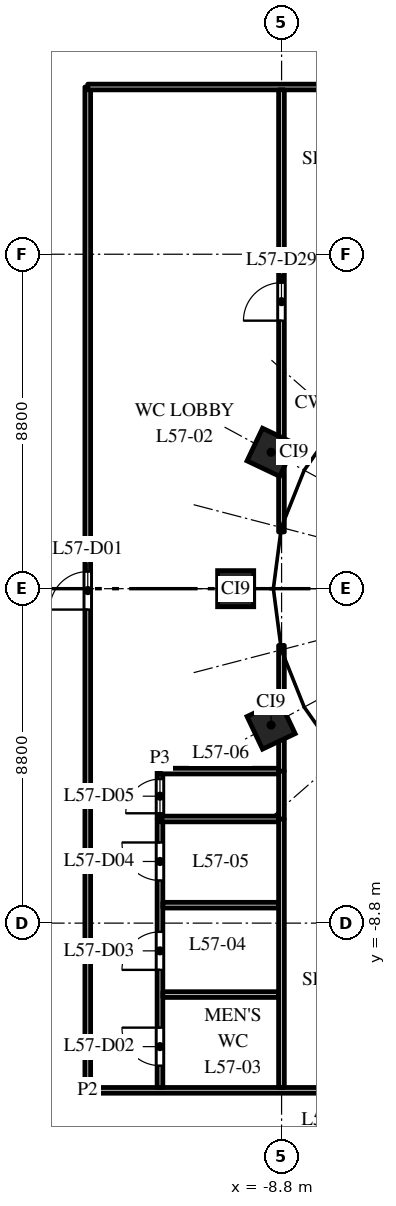
"""IFC4 building model, lengths in metres.
Left out: names, types, materials, properties, quantities, classifications, styles, units other than length and angle.
Written with IfcOpenShell. Run it as: python <this file> out.ifc"""

import sys

from ifc_helpers import new_model, si_unit, direction, frame, frame_2d, origin, origin_2d, place, context, subcontext, project, spatial, rectangle, extrude, element, fill, save


model = new_model("IFC4")
c1 = context("Model", 3, precision=1e-05, world=origin(), true_north=direction((0.0, 1.0)))
c2 = subcontext(c1, "Body", "Model", "MODEL_VIEW")
j1 = project(units=[si_unit("LENGTHUNIT", "METRE"), si_unit("PLANEANGLEUNIT", "RADIAN")], contexts=[c1])
p1 = place(None, origin())
s1 = spatial("IfcSite", under=j1, at=p1, CompositionType="ELEMENT")
p2 = place(p1, origin())
s2 = spatial("IfcBuilding", under=s1, at=p2, CompositionType="ELEMENT")
p3 = place(p2, frame((0.0, 0.0, 269.5)))
s3 = spatial("IfcBuildingStorey", under=s2, at=p3, CompositionType="ELEMENT", Elevation=269.5)
for number, where, z_axis, x_axis in (
    (1, (-9.076, 3.588, 0.0), (0.0, 0.0, 1.0), (-0.429, -0.903, 0.0)),
    (2, (-10.008, 0.0, 0.0), (0.0, 0.0, 1.0), (0.0, -1.0, 0.0)),
    (3, (-9.076, -3.588, 0.0), (0.0, 0.0, 1.0), (0.429, -0.903, 0.0)),
):
    element("IfcColumn", number, at=place(p3, frame(where, z_axis=z_axis, x_axis=x_axis)), inside=s3, PredefinedType="COLUMN", context=c2, shape_type="SweptSolid", body=[
        extrude(rectangle(XDim=0.95, YDim=0.95, at=origin_2d()), origin(), (0.0, 0.0, 1.0), 4.0),
    ])
p4 = place(p3, frame((-13.9, -13.2, 0.0), z_axis=(0.0, 0.0, 1.0), x_axis=(0.0, 1.0, 0.0)))
e4 = element("IfcWall", 4, at=p4, inside=s3, PredefinedType="PARTITIONING", context=c2, shape_type="SweptSolid", body=[
    extrude(rectangle(XDim=26.4, YDim=0.15, at=frame_2d((13.2, 0.0))), origin(), (0.0, 0.0, 1.0), 2.75),
])
p5 = place(p4, frame((12.65, 0.0, 0.0)))
e5 = element("IfcOpeningElement", 5, at=p5, cuts=e4, PredefinedType="OPENING", context=c2, shape_type="SweptSolid", body=[
    extrude(rectangle(XDim=1.0, YDim=2.1, at=frame_2d((0.5, 1.05))), frame((0.0, 0.085, 0.0), z_axis=(0.0, -1.0, 0.0), x_axis=(1.0, 0.0, 0.0)), (0.0, 0.0, 1.0), 0.17),
])
p6 = place(p3, frame((-13.9, -13.2, 0.0), z_axis=(0.0, 0.0, 1.0), x_axis=(1.0, 0.0, 0.0)))
e6 = element("IfcWall", 6, at=p6, inside=s3, PredefinedType="PARTITIONING", context=c2, shape_type="SweptSolid", body=[
    extrude(rectangle(XDim=27.8, YDim=0.15, at=frame_2d((13.9, 0.0))), origin(), (0.0, 0.0, 1.0), 2.85),
])
p7 = place(p6, frame((6.83, 0.0, 0.0)))
e7 = element("IfcOpeningElement", 7, at=p7, cuts=e6, PredefinedType="OPENING", context=c2, shape_type="SweptSolid", body=[
    extrude(rectangle(XDim=1.0, YDim=2.1, at=frame_2d((0.5, 1.05))), frame((0.0, 0.085, 0.0), z_axis=(0.0, -1.0, 0.0), x_axis=(1.0, 0.0, 0.0)), (0.0, 0.0, 1.0), 0.17),
])
p8 = place(p6, frame((11.463, 0.0, 0.0)))
e8 = element("IfcOpeningElement", 8, at=p8, cuts=e6, PredefinedType="OPENING", context=c2, shape_type="SweptSolid", body=[
    extrude(rectangle(XDim=1.0, YDim=2.1, at=frame_2d((0.5, 1.05))), frame((0.0, 0.085, 0.0), z_axis=(0.0, -1.0, 0.0), x_axis=(1.0, 0.0, 0.0)), (0.0, 0.0, 1.0), 0.17),
])
p9 = place(p6, frame((16.097, 0.0, 0.0)))
e9 = element("IfcOpeningElement", 9, at=p9, cuts=e6, PredefinedType="OPENING", context=c2, shape_type="SweptSolid", body=[
    extrude(rectangle(XDim=1.0, YDim=2.1, at=frame_2d((0.5, 1.05))), frame((0.0, 0.085, 0.0), z_axis=(0.0, -1.0, 0.0), x_axis=(1.0, 0.0, 0.0)), (0.0, 0.0, 1.0), 0.17),
])
p10 = place(p3, frame((-13.9, 13.2, 0.0), z_axis=(0.0, 0.0, 1.0), x_axis=(1.0, 0.0, 0.0)))
e10 = element("IfcWall", 10, at=p10, inside=s3, PredefinedType="PARTITIONING", context=c2, shape_type="SweptSolid", body=[
    extrude(rectangle(XDim=27.8, YDim=0.15, at=frame_2d((13.9, 0.0))), origin(), (0.0, 0.0, 1.0), 2.85),
])
p11 = place(p10, frame((11.63, 0.0, 0.0)))
e11 = element("IfcOpeningElement", 11, at=p11, cuts=e10, PredefinedType="OPENING", context=c2, shape_type="SweptSolid", body=[
    extrude(rectangle(XDim=1.0, YDim=2.1, at=frame_2d((0.5, 1.05))), frame((0.0, 0.085, 0.0), z_axis=(0.0, -1.0, 0.0), x_axis=(1.0, 0.0, 0.0)), (0.0, 0.0, 1.0), 0.17),
])
p12 = place(p10, frame((16.263, 0.0, 0.0)))
e12 = element("IfcOpeningElement", 12, at=p12, cuts=e10, PredefinedType="OPENING", context=c2, shape_type="SweptSolid", body=[
    extrude(rectangle(XDim=1.0, YDim=2.1, at=frame_2d((0.5, 1.05))), frame((0.0, 0.085, 0.0), z_axis=(0.0, -1.0, 0.0), x_axis=(1.0, 0.0, 0.0)), (0.0, 0.0, 1.0), 0.17),
])
p13 = place(p10, frame((20.897, 0.0, 0.0)))
e13 = element("IfcOpeningElement", 13, at=p13, cuts=e10, PredefinedType="OPENING", context=c2, shape_type="SweptSolid", body=[
    extrude(rectangle(XDim=1.0, YDim=2.1, at=frame_2d((0.5, 1.05))), frame((0.0, 0.085, 0.0), z_axis=(0.0, -1.0, 0.0), x_axis=(1.0, 0.0, 0.0)), (0.0, 0.0, 1.0), 0.17),
])
p14 = place(p3, frame((-12.0, -13.125, 0.0), z_axis=(0.0, 0.0, 1.0), x_axis=(0.0, 1.0, 0.0)))
e14 = element("IfcWall", 14, at=p14, inside=s3, PredefinedType="PARTITIONING", context=c2, shape_type="SweptSolid", body=[
    extrude(rectangle(XDim=7.065, YDim=0.15, at=frame_2d((3.532, 0.0))), origin(), (0.0, 0.0, 1.0), 2.75),
])
p15 = place(p14, frame((0.575, 0.0, 0.0)))
e15 = element("IfcOpeningElement", 15, at=p15, cuts=e14, PredefinedType="OPENING", context=c2, shape_type="SweptSolid", body=[
    extrude(rectangle(XDim=1.0, YDim=2.1, at=frame_2d((0.5, 1.05))), frame((0.0, 0.085, 0.0), z_axis=(0.0, -1.0, 0.0), x_axis=(1.0, 0.0, 0.0)), (0.0, 0.0, 1.0), 0.17),
])
p16 = place(p14, frame((3.095, 0.0, 0.0)))
e16 = element("IfcOpeningElement", 16, at=p16, cuts=e14, PredefinedType="OPENING", context=c2, shape_type="SweptSolid", body=[
    extrude(rectangle(XDim=1.0, YDim=2.1, at=frame_2d((0.5, 1.05))), frame((0.0, 0.085, 0.0), z_axis=(0.0, -1.0, 0.0), x_axis=(1.0, 0.0, 0.0)), (0.0, 0.0, 1.0), 0.17),
])
p17 = place(p14, frame((5.447, 0.0, 0.0)))
e17 = element("IfcOpeningElement", 17, at=p17, cuts=e14, PredefinedType="OPENING", context=c2, shape_type="SweptSolid", body=[
    extrude(rectangle(XDim=1.0, YDim=2.1, at=frame_2d((0.5, 1.05))), frame((0.0, 0.085, 0.0), z_axis=(0.0, -1.0, 0.0), x_axis=(1.0, 0.0, 0.0)), (0.0, 0.0, 1.0), 0.17),
])
p18 = place(p3, frame((-11.925, -10.68, 0.0), z_axis=(0.0, 0.0, 1.0), x_axis=(1.0, 0.0, 0.0)))
e18 = element("IfcWall", 18, at=p18, inside=s3, PredefinedType="PARTITIONING", context=c2, shape_type="SweptSolid", body=[
    extrude(rectangle(XDim=3.047, YDim=0.15, at=frame_2d((1.523, 0.0))), origin(), (0.0, 0.0, 1.0), 3.7),
])
p19 = place(p3, frame((-11.925, -8.328, 0.0), z_axis=(0.0, 0.0, 1.0), x_axis=(1.0, 0.0, 0.0)))
e19 = element("IfcWall", 19, at=p19, inside=s3, PredefinedType="PARTITIONING", context=c2, shape_type="SweptSolid", body=[
    extrude(rectangle(XDim=3.047, YDim=0.15, at=frame_2d((1.523, 0.0))), origin(), (0.0, 0.0, 1.0), 2.75),
])
p20 = place(p3, frame((-12.0, -6.06, 0.0), z_axis=(0.0, 0.0, 1.0), x_axis=(0.0, 1.0, 0.0)))
e20 = element("IfcWall", 20, at=p20, inside=s3, PredefinedType="PARTITIONING", context=c2, shape_type="SweptSolid", body=[
    extrude(rectangle(XDim=1.26, YDim=0.15, at=frame_2d((0.63, 0.0))), origin(), (0.0, 0.0, 1.0), 3.7),
])
p21 = place(p20, frame((0.15, 0.0, 0.0)))
e21 = element("IfcOpeningElement", 21, at=p21, cuts=e20, PredefinedType="OPENING", context=c2, shape_type="SweptSolid", body=[
    extrude(rectangle(XDim=0.9, YDim=2.1, at=frame_2d((0.45, 1.05))), frame((0.0, 0.085, 0.0), z_axis=(0.0, -1.0, 0.0), x_axis=(1.0, 0.0, 0.0)), (0.0, 0.0, 1.0), 0.17),
])
for number, where, z_axis, x_axis in (
    (22, (-12.0, -6.06, 0.0), (0.0, 0.0, 1.0), (1.0, 0.0, 0.0)),
    (23, (-12.0, -4.8, 0.0), (0.0, 0.0, 1.0), (1.0, 0.0, 0.0)),
):
    element("IfcWall", number, at=place(p3, frame(where, z_axis=z_axis, x_axis=x_axis)), inside=s3, PredefinedType="PARTITIONING", context=c2, shape_type="SweptSolid", body=[
        extrude(rectangle(XDim=3.197, YDim=0.15, at=frame_2d((1.599, 0.0))), origin(), (0.0, 0.0, 1.0), 3.7),
    ])
p22 = place(p3, frame((-8.803, -13.125, 0.0), z_axis=(0.0, 0.0, 1.0), x_axis=(0.0, 1.0, 0.0)))
e24 = element("IfcWall", 24, at=p22, inside=s3, PredefinedType="PARTITIONING", context=c2, shape_type="SweptSolid", body=[
    extrude(rectangle(XDim=7.065, YDim=0.15, at=frame_2d((3.532, 0.0))), origin(), (0.0, 0.0, 1.0), 2.75),
])
p23 = place(p3, frame((-8.803, -6.06, 0.0), z_axis=(0.0, 0.0, 1.0), x_axis=(0.0, 1.0, 0.0)))
e25 = element("IfcWall", 25, at=p23, inside=s3, PredefinedType="PARTITIONING", context=c2, shape_type="SweptSolid", body=[
    extrude(rectangle(XDim=1.26, YDim=0.15, at=frame_2d((0.63, 0.0))), origin(), (0.0, 0.0, 1.0), 3.7),
])
p24 = place(p3, frame((-8.803, -4.8, 0.0), z_axis=(0.0, 0.0, 1.0), x_axis=(0.0, 1.0, 0.0)))
e26 = element("IfcWall", 26, at=p24, inside=s3, PredefinedType="PARTITIONING", context=c2, shape_type="SweptSolid", body=[
    extrude(rectangle(XDim=3.307, YDim=0.15, at=frame_2d((1.654, 0.0))), origin(), (0.0, 0.0, 1.0), 3.0),
])
p25 = place(p3, frame((-8.803, 1.493, 0.0), z_axis=(0.0, 0.0, 1.0), x_axis=(0.0, 1.0, 0.0)))
e27 = element("IfcWall", 27, at=p25, inside=s3, PredefinedType="PARTITIONING", context=c2, shape_type="SweptSolid", body=[
    extrude(rectangle(XDim=11.632, YDim=0.15, at=frame_2d((5.816, 0.0))), origin(), (0.0, 0.0, 1.0), 2.75),
])
p26 = place(p25, frame((5.559, 0.0, 0.0)))
e28 = element("IfcOpeningElement", 28, at=p26, cuts=e27, PredefinedType="OPENING", context=c2, shape_type="SweptSolid", body=[
    extrude(rectangle(XDim=1.0, YDim=2.1, at=frame_2d((0.5, 1.05))), frame((0.0, 0.085, 0.0), z_axis=(0.0, -1.0, 0.0), x_axis=(1.0, 0.0, 0.0)), (0.0, 0.0, 1.0), 0.17),
])
p27 = place(p5, origin())
e29 = element("IfcDoor", 29, at=p27, inside=s3, OperationType="SINGLE_SWING_LEFT", PredefinedType="DOOR", context=c2, shape_type="SweptSolid", body=[
    extrude(rectangle(XDim=1.0, YDim=2.1, at=frame_2d((0.5, 1.05))), frame((0.0, 0.025, 0.0), z_axis=(0.0, -1.0, 0.0), x_axis=(1.0, 0.0, 0.0)), (0.0, 0.0, 1.0), 0.05),
])
fill(e5, e29)
p28 = place(p15, origin())
e30 = element("IfcDoor", 30, at=p28, inside=s3, OperationType="SINGLE_SWING_RIGHT", PredefinedType="DOOR", context=c2, shape_type="SweptSolid", body=[
    extrude(rectangle(XDim=1.0, YDim=2.1, at=frame_2d((0.5, 1.05))), frame((0.0, 0.025, 0.0), z_axis=(0.0, -1.0, 0.0), x_axis=(1.0, 0.0, 0.0)), (0.0, 0.0, 1.0), 0.05),
])
fill(e15, e30)
p29 = place(p16, origin())
e31 = element("IfcDoor", 31, at=p29, inside=s3, OperationType="SINGLE_SWING_LEFT", PredefinedType="DOOR", context=c2, shape_type="SweptSolid", body=[
    extrude(rectangle(XDim=1.0, YDim=2.1, at=frame_2d((0.5, 1.05))), frame((0.0, 0.025, 0.0), z_axis=(0.0, -1.0, 0.0), x_axis=(1.0, 0.0, 0.0)), (0.0, 0.0, 1.0), 0.05),
])
fill(e16, e31)
p30 = place(p17, origin())
e32 = element("IfcDoor", 32, at=p30, inside=s3, OperationType="SINGLE_SWING_RIGHT", PredefinedType="DOOR", context=c2, shape_type="SweptSolid", body=[
    extrude(rectangle(XDim=1.0, YDim=2.1, at=frame_2d((0.5, 1.05))), frame((0.0, 0.025, 0.0), z_axis=(0.0, -1.0, 0.0), x_axis=(1.0, 0.0, 0.0)), (0.0, 0.0, 1.0), 0.05),
])
fill(e17, e32)
p31 = place(p21, origin())
e33 = element("IfcDoor", 33, at=p31, inside=s3, OperationType="SINGLE_SWING_LEFT", PredefinedType="DOOR", context=c2, shape_type="SweptSolid", body=[
    extrude(rectangle(XDim=0.9, YDim=2.1, at=frame_2d((0.45, 1.05))), frame((0.0, 0.025, 0.0), z_axis=(0.0, -1.0, 0.0), x_axis=(1.0, 0.0, 0.0)), (0.0, 0.0, 1.0), 0.05),
])
fill(e21, e33)
p32 = place(p26, origin())
e34 = element("IfcDoor", 34, at=p32, inside=s3, OperationType="SINGLE_SWING_LEFT", PredefinedType="DOOR", context=c2, shape_type="SweptSolid", body=[
    extrude(rectangle(XDim=1.0, YDim=2.1, at=frame_2d((0.5, 1.05))), frame((0.0, 0.025, 0.0), z_axis=(0.0, -1.0, 0.0), x_axis=(1.0, 0.0, 0.0)), (0.0, 0.0, 1.0), 0.05),
])
fill(e28, e34)
save(model, sys.argv[1])
